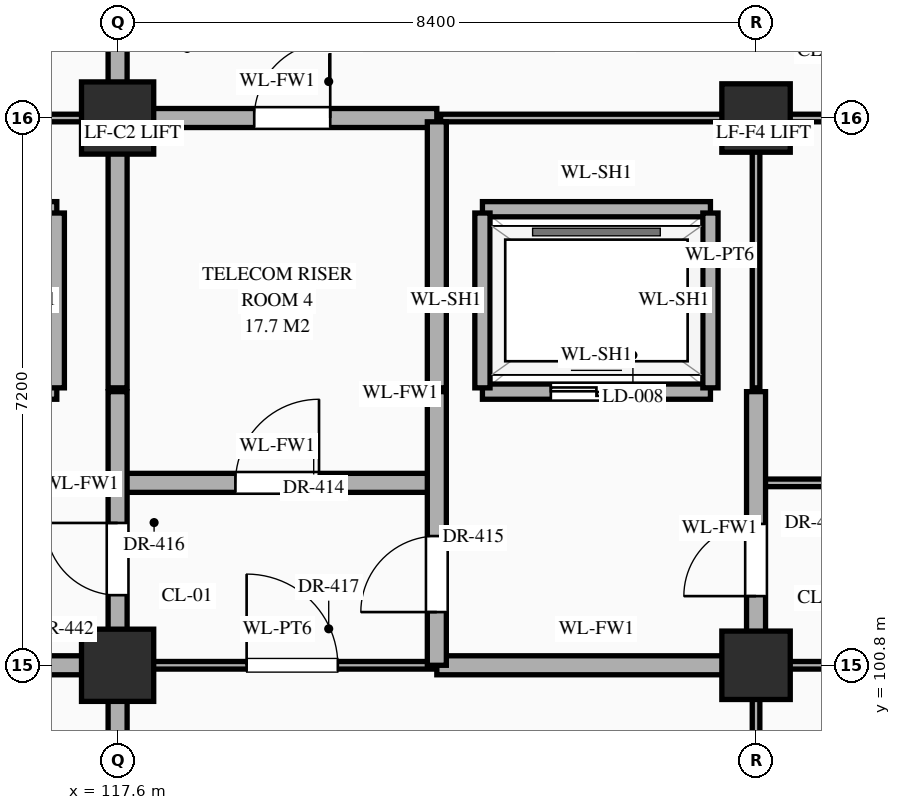
"""IFC4 building model, lengths in metres.
Left out: names, types, materials, properties, quantities, classifications, styles, units other than length and angle.
Written with IfcOpenShell. Run it as: python <this file> out.ifc"""

import sys

from ifc_helpers import new_model, si_unit, direction, frame, frame_2d, origin, origin_2d, place, context, subcontext, project, spatial, rectangle, extrude, element, fill, save


model = new_model("IFC4")
c1 = context("Model", 3, precision=1e-05, world=origin(), true_north=direction((0.0, 1.0)))
c2 = subcontext(c1, "Body", "Model", "MODEL_VIEW")
j1 = project(units=[si_unit("LENGTHUNIT", "METRE"), si_unit("PLANEANGLEUNIT", "RADIAN")], contexts=[c1])
p1 = place(None, origin())
s1 = spatial("IfcSite", under=j1, at=p1, CompositionType="ELEMENT")
p2 = place(p1, origin())
s2 = spatial("IfcBuilding", under=s1, at=p2, CompositionType="ELEMENT")
p3 = place(p2, frame((0.0, 0.0, -5.4)))
s3 = spatial("IfcBuildingStorey", under=s2, at=p3, CompositionType="ELEMENT", Elevation=-5.4)
for number, where, z_axis, x_axis in (
    (1, (117.6, 100.8, 0.0), (0.0, 0.0, 1.0), (1.0, 0.0, 0.0)),
    (2, (117.6, 108.0, 0.0), (0.0, 0.0, 1.0), (1.0, 0.0, 0.0)),
):
    element("IfcColumn", number, at=place(p3, frame(where, z_axis=z_axis, x_axis=x_axis)), inside=s3, PredefinedType="COLUMN", context=c2, shape_type="SweptSolid", body=[
        extrude(rectangle(XDim=0.95, YDim=0.95, at=origin_2d()), origin(), (0.0, 0.0, 1.0), 5.4),
    ])
for number, where, z_axis, x_axis in (
    (3, (126.0, 100.8, 0.0), (0.0, 0.0, 1.0), (1.0, 0.0, 0.0)),
    (4, (126.0, 108.0, 0.0), (0.0, 0.0, 1.0), (1.0, 0.0, 0.0)),
):
    element("IfcColumn", number, at=place(p3, frame(where, z_axis=z_axis, x_axis=x_axis)), inside=s3, PredefinedType="COLUMN", context=c2, shape_type="SweptSolid", body=[
        extrude(rectangle(XDim=0.9, YDim=0.9, at=origin_2d()), origin(), (0.0, 0.0, 1.0), 5.4),
    ])
p4 = place(p3, frame((113.4, 100.8, 0.0), z_axis=(0.0, 0.0, 1.0), x_axis=(1.0, 0.0, 0.0)))
e5 = element("IfcWall", 5, at=p4, inside=s3, PredefinedType="STANDARD", context=c2, shape_type="SweptSolid", body=[
    extrude(rectangle(XDim=4.2, YDim=0.25, at=frame_2d((2.1, 0.0))), origin(), (0.0, 0.0, 1.0), 4.25),
])
p5 = place(p4, frame((0.25, 0.0, 0.0)))
e6 = element("IfcOpeningElement", 6, at=p5, cuts=e5, PredefinedType="OPENING", context=c2, shape_type="SweptSolid", body=[
    extrude(rectangle(XDim=1.1, YDim=2.2, at=frame_2d((0.55, 1.1))), frame((0.0, 0.137, 0.0), z_axis=(0.0, -1.0, 0.0), x_axis=(1.0, 0.0, 0.0)), (0.0, 0.0, 1.0), 0.274),
])
p6 = place(p4, frame((2.202, 0.0, 0.0)))
e7 = element("IfcOpeningElement", 7, at=p6, cuts=e5, PredefinedType="OPENING", context=c2, shape_type="SweptSolid", body=[
    extrude(rectangle(XDim=1.0, YDim=2.2, at=frame_2d((0.5, 1.1))), frame((0.0, 0.137, 0.0), z_axis=(0.0, -1.0, 0.0), x_axis=(1.0, 0.0, 0.0)), (0.0, 0.0, 1.0), 0.274),
])
p7 = place(p3, frame((117.6, 100.8, 0.0), z_axis=(0.0, 0.0, 1.0), x_axis=(1.0, 0.0, 0.0)))
e8 = element("IfcWall", 8, at=p7, inside=s3, PredefinedType="STANDARD", context=c2, shape_type="SweptSolid", body=[
    extrude(rectangle(XDim=4.2, YDim=0.1, at=frame_2d((2.1, 0.0))), origin(), (0.0, 0.0, 1.0), 4.25),
])
p8 = place(p7, frame((1.698, 0.0, 0.0)))
e9 = element("IfcOpeningElement", 9, at=p8, cuts=e8, PredefinedType="OPENING", context=c2, shape_type="SweptSolid", body=[
    extrude(rectangle(XDim=1.2, YDim=2.35, at=frame_2d((0.6, 1.175))), frame((0.0, 0.062, 0.0), z_axis=(0.0, -1.0, 0.0), x_axis=(1.0, 0.0, 0.0)), (0.0, 0.0, 1.0), 0.124),
])
p9 = place(p3, frame((121.8, 100.8, 0.0), z_axis=(0.0, 0.0, 1.0), x_axis=(1.0, 0.0, 0.0)))
e10 = element("IfcWall", 10, at=p9, inside=s3, PredefinedType="STANDARD", context=c2, shape_type="SweptSolid", body=[
    extrude(rectangle(XDim=4.2, YDim=0.25, at=frame_2d((2.1, 0.0))), origin(), (0.0, 0.0, 1.0), 4.25),
])
p10 = place(p3, frame((126.0, 100.8, 0.0), z_axis=(0.0, 0.0, 1.0), x_axis=(1.0, 0.0, 0.0)))
e11 = element("IfcWall", 11, at=p10, inside=s3, PredefinedType="STANDARD", context=c2, shape_type="SweptSolid", body=[
    extrude(rectangle(XDim=25.2, YDim=0.1, at=frame_2d((12.6, 0.0))), origin(), (0.0, 0.0, 1.0), 4.25),
])
p11 = place(p10, frame((3.72, 0.0, 0.0)))
e12 = element("IfcOpeningElement", 12, at=p11, cuts=e11, PredefinedType="OPENING", context=c2, shape_type="SweptSolid", body=[
    extrude(rectangle(XDim=0.96, YDim=2.2, at=frame_2d((0.48, 1.1))), frame((0.0, 0.062, 0.0), z_axis=(0.0, -1.0, 0.0), x_axis=(1.0, 0.0, 0.0)), (0.0, 0.0, 1.0), 0.124),
])
p12 = place(p10, frame((9.785, 0.0, 0.0)))
e13 = element("IfcOpeningElement", 13, at=p12, cuts=e11, PredefinedType="OPENING", context=c2, shape_type="SweptSolid", body=[
    extrude(rectangle(XDim=1.0, YDim=2.25, at=frame_2d((0.5, 1.125))), frame((0.0, 0.062, 0.0), z_axis=(0.0, -1.0, 0.0), x_axis=(1.0, 0.0, 0.0)), (0.0, 0.0, 1.0), 0.124),
])
p13 = place(p10, frame((12.48, 0.0, 0.0)))
e14 = element("IfcOpeningElement", 14, at=p13, cuts=e11, PredefinedType="OPENING", context=c2, shape_type="SweptSolid", body=[
    extrude(rectangle(XDim=1.04, YDim=2.2, at=frame_2d((0.52, 1.1))), frame((0.0, 0.062, 0.0), z_axis=(0.0, -1.0, 0.0), x_axis=(1.0, 0.0, 0.0)), (0.0, 0.0, 1.0), 0.124),
])
p14 = place(p10, frame((14.775, 0.0, 0.0)))
e15 = element("IfcOpeningElement", 15, at=p14, cuts=e11, PredefinedType="OPENING", context=c2, shape_type="SweptSolid", body=[
    extrude(rectangle(XDim=1.08, YDim=2.25, at=frame_2d((0.54, 1.125))), frame((0.0, 0.062, 0.0), z_axis=(0.0, -1.0, 0.0), x_axis=(1.0, 0.0, 0.0)), (0.0, 0.0, 1.0), 0.124),
])
p15 = place(p10, frame((20.452, 0.0, 0.0)))
e16 = element("IfcOpeningElement", 16, at=p15, cuts=e11, PredefinedType="OPENING", context=c2, shape_type="SweptSolid", body=[
    extrude(rectangle(XDim=1.12, YDim=2.25, at=frame_2d((0.56, 1.125))), frame((0.0, 0.062, 0.0), z_axis=(0.0, -1.0, 0.0), x_axis=(1.0, 0.0, 0.0)), (0.0, 0.0, 1.0), 0.124),
])
p16 = place(p3, frame((117.6, 103.2, 0.0), z_axis=(0.0, 0.0, 1.0), x_axis=(1.0, 0.0, 0.0)))
e17 = element("IfcWall", 17, at=p16, inside=s3, PredefinedType="STANDARD", context=c2, shape_type="SweptSolid", body=[
    extrude(rectangle(XDim=4.2, YDim=0.25, at=frame_2d((2.1, 0.0))), origin(), (0.0, 0.0, 1.0), 5.1),
])
p17 = place(p16, frame((1.55, 0.0, 0.0)))
e18 = element("IfcOpeningElement", 18, at=p17, cuts=e17, PredefinedType="OPENING", context=c2, shape_type="SweptSolid", body=[
    extrude(rectangle(XDim=1.1, YDim=2.2, at=frame_2d((0.55, 1.1))), frame((0.0, 0.137, 0.0), z_axis=(0.0, -1.0, 0.0), x_axis=(1.0, 0.0, 0.0)), (0.0, 0.0, 1.0), 0.274),
])
p18 = place(p3, frame((126.0, 103.2, 0.0), z_axis=(0.0, 0.0, 1.0), x_axis=(1.0, 0.0, 0.0)))
e19 = element("IfcWall", 19, at=p18, inside=s3, PredefinedType="STANDARD", context=c2, shape_type="SweptSolid", body=[
    extrude(rectangle(XDim=25.2, YDim=0.1, at=frame_2d((12.6, 0.0))), origin(), (0.0, 0.0, 1.0), 5.1),
])
p19 = place(p18, frame((3.75, 0.0, 0.0)))
e20 = element("IfcOpeningElement", 20, at=p19, cuts=e19, PredefinedType="OPENING", context=c2, shape_type="SweptSolid", body=[
    extrude(rectangle(XDim=0.9, YDim=2.15, at=frame_2d((0.45, 1.075))), frame((0.0, 0.062, 0.0), z_axis=(0.0, -1.0, 0.0), x_axis=(1.0, 0.0, 0.0)), (0.0, 0.0, 1.0), 0.124),
])
p20 = place(p18, frame((12.17, 0.0, 0.0)))
e21 = element("IfcOpeningElement", 21, at=p20, cuts=e19, PredefinedType="OPENING", context=c2, shape_type="SweptSolid", body=[
    extrude(rectangle(XDim=0.86, YDim=2.1, at=frame_2d((0.43, 1.05))), frame((0.0, 0.062, 0.0), z_axis=(0.0, -1.0, 0.0), x_axis=(1.0, 0.0, 0.0)), (0.0, 0.0, 1.0), 0.124),
])
p21 = place(p18, frame((20.54, 0.0, 0.0)))
e22 = element("IfcOpeningElement", 22, at=p21, cuts=e19, PredefinedType="OPENING", context=c2, shape_type="SweptSolid", body=[
    extrude(rectangle(XDim=0.92, YDim=2.15, at=frame_2d((0.46, 1.075))), frame((0.0, 0.062, 0.0), z_axis=(0.0, -1.0, 0.0), x_axis=(1.0, 0.0, 0.0)), (0.0, 0.0, 1.0), 0.124),
])
p22 = place(p3, frame((114.4, 104.4, 0.0), z_axis=(0.0, 0.0, 1.0), x_axis=(1.0, 0.0, 0.0)))
e23 = element("IfcWall", 23, at=p22, inside=s3, PredefinedType="STANDARD", context=c2, shape_type="SweptSolid", body=[
    extrude(rectangle(XDim=2.4, YDim=0.2, at=frame_2d((1.2, 0.0))), origin(), (0.0, 0.0, 1.0), 5.1),
])
p23 = place(p22, frame((0.675, 0.0, 0.0)))
e24 = element("IfcOpeningElement", 24, at=p23, cuts=e23, PredefinedType="OPENING", context=c2, shape_type="SweptSolid", body=[
    extrude(rectangle(XDim=1.05, YDim=2.15, at=frame_2d((0.525, 1.075))), frame((0.0, 0.112, 0.0), z_axis=(0.0, -1.0, 0.0), x_axis=(1.0, 0.0, 0.0)), (0.0, 0.0, 1.0), 0.224),
])
p24 = place(p3, frame((122.4, 104.4, 0.0), z_axis=(0.0, 0.0, 1.0), x_axis=(1.0, 0.0, 0.0)))
e25 = element("IfcWall", 25, at=p24, inside=s3, PredefinedType="STANDARD", context=c2, shape_type="SweptSolid", body=[
    extrude(rectangle(XDim=3.0, YDim=0.2, at=frame_2d((1.5, 0.0))), origin(), (0.0, 0.0, 1.0), 5.1),
])
p25 = place(p24, frame((0.9, 0.0, 0.0)))
e26 = element("IfcOpeningElement", 26, at=p25, cuts=e25, PredefinedType="OPENING", context=c2, shape_type="SweptSolid", body=[
    extrude(rectangle(XDim=1.2, YDim=2.15, at=frame_2d((0.6, 1.075))), frame((0.0, 0.112, 0.0), z_axis=(0.0, -1.0, 0.0), x_axis=(1.0, 0.0, 0.0)), (0.0, 0.0, 1.0), 0.224),
])
p26 = place(p3, frame((114.4, 106.8, 0.0), z_axis=(0.0, 0.0, 1.0), x_axis=(1.0, 0.0, 0.0)))
e27 = element("IfcWall", 27, at=p26, inside=s3, PredefinedType="STANDARD", context=c2, shape_type="SweptSolid", body=[
    extrude(rectangle(XDim=2.4, YDim=0.2, at=frame_2d((1.2, 0.0))), origin(), (0.0, 0.0, 1.0), 5.1),
])
p27 = place(p3, frame((122.4, 106.8, 0.0), z_axis=(0.0, 0.0, 1.0), x_axis=(1.0, 0.0, 0.0)))
e28 = element("IfcWall", 28, at=p27, inside=s3, PredefinedType="STANDARD", context=c2, shape_type="SweptSolid", body=[
    extrude(rectangle(XDim=3.0, YDim=0.2, at=frame_2d((1.5, 0.0))), origin(), (0.0, 0.0, 1.0), 5.1),
])
p28 = place(p3, frame((113.45, 108.0, 0.0), z_axis=(0.0, 0.0, 1.0), x_axis=(1.0, 0.0, 0.0)))
e29 = element("IfcWall", 29, at=p28, inside=s3, PredefinedType="STANDARD", context=c2, shape_type="SweptSolid", body=[
    extrude(rectangle(XDim=4.1, YDim=0.1, at=frame_2d((2.05, 0.0))), origin(), (0.0, 0.0, 1.0), 4.25),
])
p29 = place(p3, frame((117.6, 108.0, 0.0), z_axis=(0.0, 0.0, 1.0), x_axis=(1.0, 0.0, 0.0)))
e30 = element("IfcWall", 30, at=p29, inside=s3, PredefinedType="STANDARD", context=c2, shape_type="SweptSolid", body=[
    extrude(rectangle(XDim=4.2, YDim=0.25, at=frame_2d((2.1, 0.0))), origin(), (0.0, 0.0, 1.0), 4.13),
])
p30 = place(p29, frame((1.798, 0.0, 0.0)))
e31 = element("IfcOpeningElement", 31, at=p30, cuts=e30, PredefinedType="OPENING", context=c2, shape_type="SweptSolid", body=[
    extrude(rectangle(XDim=1.0, YDim=2.2, at=frame_2d((0.5, 1.1))), frame((0.0, 0.137, 0.0), z_axis=(0.0, -1.0, 0.0), x_axis=(1.0, 0.0, 0.0)), (0.0, 0.0, 1.0), 0.274),
])
p31 = place(p3, frame((121.85, 108.0, 0.0), z_axis=(0.0, 0.0, 1.0), x_axis=(1.0, 0.0, 0.0)))
e32 = element("IfcWall", 32, at=p31, inside=s3, PredefinedType="STANDARD", context=c2, shape_type="SweptSolid", body=[
    extrude(rectangle(XDim=4.1, YDim=0.1, at=frame_2d((2.05, 0.0))), origin(), (0.0, 0.0, 1.0), 4.13),
])
p32 = place(p3, frame((126.0, 108.0, 0.0), z_axis=(0.0, 0.0, 1.0), x_axis=(1.0, 0.0, 0.0)))
e33 = element("IfcWall", 33, at=p32, inside=s3, PredefinedType="STANDARD", context=c2, shape_type="SweptSolid", body=[
    extrude(rectangle(XDim=25.2, YDim=0.1, at=frame_2d((12.6, 0.0))), origin(), (0.0, 0.0, 1.0), 4.13),
])
p33 = place(p32, frame((3.62, 0.0, 0.0)))
e34 = element("IfcOpeningElement", 34, at=p33, cuts=e33, PredefinedType="OPENING", context=c2, shape_type="SweptSolid", body=[
    extrude(rectangle(XDim=1.16, YDim=2.3, at=frame_2d((0.58, 1.15))), frame((0.0, 0.062, 0.0), z_axis=(0.0, -1.0, 0.0), x_axis=(1.0, 0.0, 0.0)), (0.0, 0.0, 1.0), 0.124),
])
p34 = place(p32, frame((12.0, 0.0, 0.0)))
e35 = element("IfcOpeningElement", 35, at=p34, cuts=e33, PredefinedType="OPENING", context=c2, shape_type="SweptSolid", body=[
    extrude(rectangle(XDim=1.2, YDim=2.35, at=frame_2d((0.6, 1.175))), frame((0.0, 0.062, 0.0), z_axis=(0.0, -1.0, 0.0), x_axis=(1.0, 0.0, 0.0)), (0.0, 0.0, 1.0), 0.124),
])
p35 = place(p32, frame((20.393, 0.0, 0.0)))
e36 = element("IfcOpeningElement", 36, at=p35, cuts=e33, PredefinedType="OPENING", context=c2, shape_type="SweptSolid", body=[
    extrude(rectangle(XDim=1.24, YDim=2.3, at=frame_2d((0.62, 1.15))), frame((0.0, 0.062, 0.0), z_axis=(0.0, -1.0, 0.0), x_axis=(1.0, 0.0, 0.0)), (0.0, 0.0, 1.0), 0.124),
])
p36 = place(p3, frame((116.8, 104.45, 0.0), z_axis=(0.0, 0.0, 1.0), x_axis=(0.0, 1.0, 0.0)))
e37 = element("IfcWall", 37, at=p36, inside=s3, PredefinedType="STANDARD", context=c2, shape_type="SweptSolid", body=[
    extrude(rectangle(XDim=2.3, YDim=0.2, at=frame_2d((1.15, 0.0))), origin(), (0.0, 0.0, 1.0), 5.1),
])
p37 = place(p3, frame((117.6, 91.2, 0.0), z_axis=(0.0, 0.0, 1.0), x_axis=(0.0, 1.0, 0.0)))
e38 = element("IfcWall", 38, at=p37, inside=s3, PredefinedType="STANDARD", context=c2, shape_type="SweptSolid", body=[
    extrude(rectangle(XDim=13.2, YDim=0.25, at=frame_2d((6.6, 0.0))), origin(), (0.0, 0.0, 1.0), 4.35),
])
p38 = place(p37, frame((0.502, 0.0, 0.0)))
e39 = element("IfcOpeningElement", 39, at=p38, cuts=e38, PredefinedType="OPENING", context=c2, shape_type="SweptSolid", body=[
    extrude(rectangle(XDim=1.0, YDim=2.2, at=frame_2d((0.5, 1.1))), frame((0.0, 0.137, 0.0), z_axis=(0.0, -1.0, 0.0), x_axis=(1.0, 0.0, 0.0)), (0.0, 0.0, 1.0), 0.274),
])
p39 = place(p37, frame((10.522, 0.0, 0.0)))
e40 = element("IfcOpeningElement", 40, at=p39, cuts=e38, PredefinedType="OPENING", context=c2, shape_type="SweptSolid", body=[
    extrude(rectangle(XDim=0.95, YDim=2.15, at=frame_2d((0.475, 1.075))), frame((0.0, 0.137, 0.0), z_axis=(0.0, -1.0, 0.0), x_axis=(1.0, 0.0, 0.0)), (0.0, 0.0, 1.0), 0.274),
])
p40 = place(p37, frame((3.248, 0.0, 0.0)))
e41 = element("IfcOpeningElement", 41, at=p40, cuts=e38, PredefinedType="OPENING", context=c2, shape_type="SweptSolid", body=[
    extrude(rectangle(XDim=1.1, YDim=2.2, at=frame_2d((0.55, 1.1))), frame((0.0, 0.137, 0.0), z_axis=(0.0, -1.0, 0.0), x_axis=(1.0, 0.0, 0.0)), (0.0, 0.0, 1.0), 0.274),
])
p41 = place(p3, frame((117.6, 104.45, 0.0), z_axis=(0.0, 0.0, 1.0), x_axis=(0.0, 1.0, 0.0)))
e42 = element("IfcWall", 42, at=p41, inside=s3, PredefinedType="STANDARD", context=c2, shape_type="SweptSolid", body=[
    extrude(rectangle(XDim=3.5, YDim=0.25, at=frame_2d((1.75, 0.0))), origin(), (0.0, 0.0, 1.0), 4.35),
])
p42 = place(p3, frame((117.6, 108.0, 0.0), z_axis=(0.0, 0.0, 1.0), x_axis=(0.0, 1.0, 0.0)))
e43 = element("IfcWall", 43, at=p42, inside=s3, PredefinedType="STANDARD", context=c2, shape_type="SweptSolid", body=[
    extrude(rectangle(XDim=7.16, YDim=0.25, at=frame_2d((3.58, 0.0))), origin(), (0.0, 0.0, 1.0), 4.23),
])
p43 = place(p42, frame((0.897, 0.0, 0.0)))
e44 = element("IfcOpeningElement", 44, at=p43, cuts=e43, PredefinedType="OPENING", context=c2, shape_type="SweptSolid", body=[
    extrude(rectangle(XDim=1.0, YDim=2.2, at=frame_2d((0.5, 1.1))), frame((0.0, 0.137, 0.0), z_axis=(0.0, -1.0, 0.0), x_axis=(1.0, 0.0, 0.0)), (0.0, 0.0, 1.0), 0.274),
])
p44 = place(p3, frame((121.8, 100.8, 0.0), z_axis=(0.0, 0.0, 1.0), x_axis=(0.0, 1.0, 0.0)))
e45 = element("IfcWall", 45, at=p44, inside=s3, PredefinedType="STANDARD", context=c2, shape_type="SweptSolid", body=[
    extrude(rectangle(XDim=3.6, YDim=0.25, at=frame_2d((1.8, 0.0))), origin(), (0.0, 0.0, 1.0), 4.55),
])
p45 = place(p44, frame((0.7, 0.0, 0.0)))
e46 = element("IfcOpeningElement", 46, at=p45, cuts=e45, PredefinedType="OPENING", context=c2, shape_type="SweptSolid", body=[
    extrude(rectangle(XDim=1.0, YDim=2.2, at=frame_2d((0.5, 1.1))), frame((0.0, 0.137, 0.0), z_axis=(0.0, -1.0, 0.0), x_axis=(1.0, 0.0, 0.0)), (0.0, 0.0, 1.0), 0.274),
])
p46 = place(p3, frame((121.8, 104.45, 0.0), z_axis=(0.0, 0.0, 1.0), x_axis=(0.0, 1.0, 0.0)))
e47 = element("IfcWall", 47, at=p46, inside=s3, PredefinedType="STANDARD", context=c2, shape_type="SweptSolid", body=[
    extrude(rectangle(XDim=3.5, YDim=0.25, at=frame_2d((1.75, 0.0))), origin(), (0.0, 0.0, 1.0), 4.55),
])
for number, where, z_axis, x_axis in (
    (48, (122.4, 104.45, 0.0), (0.0, 0.0, 1.0), (0.0, 1.0, 0.0)),
    (49, (125.4, 104.45, 0.0), (0.0, 0.0, 1.0), (0.0, 1.0, 0.0)),
):
    element("IfcWall", number, at=place(p3, frame(where, z_axis=z_axis, x_axis=x_axis)), inside=s3, PredefinedType="STANDARD", context=c2, shape_type="SweptSolid", body=[
        extrude(rectangle(XDim=2.3, YDim=0.2, at=frame_2d((1.15, 0.0))), origin(), (0.0, 0.0, 1.0), 5.1),
    ])
p47 = place(p3, frame((126.0, 96.0, 0.0), z_axis=(0.0, 0.0, 1.0), x_axis=(0.0, 1.0, 0.0)))
e50 = element("IfcWall", 50, at=p47, inside=s3, PredefinedType="STANDARD", context=c2, shape_type="SweptSolid", body=[
    extrude(rectangle(XDim=4.8, YDim=0.1, at=frame_2d((2.4, 0.0))), origin(), (0.0, 0.0, 1.0), 4.35),
])
p48 = place(p3, frame((126.0, 100.8, 0.0), z_axis=(0.0, 0.0, 1.0), x_axis=(0.0, 1.0, 0.0)))
e51 = element("IfcWall", 51, at=p48, inside=s3, PredefinedType="STANDARD", context=c2, shape_type="SweptSolid", body=[
    extrude(rectangle(XDim=3.6, YDim=0.25, at=frame_2d((1.8, 0.0))), origin(), (0.0, 0.0, 1.0), 4.35),
])
p49 = place(p48, frame((0.91, 0.0, 0.0)))
e52 = element("IfcOpeningElement", 52, at=p49, cuts=e51, PredefinedType="OPENING", context=c2, shape_type="SweptSolid", body=[
    extrude(rectangle(XDim=0.95, YDim=2.15, at=frame_2d((0.475, 1.075))), frame((0.0, 0.137, 0.0), z_axis=(0.0, -1.0, 0.0), x_axis=(1.0, 0.0, 0.0)), (0.0, 0.0, 1.0), 0.274),
])
p50 = place(p3, frame((126.0, 104.45, 0.0), z_axis=(0.0, 0.0, 1.0), x_axis=(0.0, 1.0, 0.0)))
e53 = element("IfcWall", 53, at=p50, inside=s3, PredefinedType="STANDARD", context=c2, shape_type="SweptSolid", body=[
    extrude(rectangle(XDim=3.5, YDim=0.1, at=frame_2d((1.75, 0.0))), origin(), (0.0, 0.0, 1.0), 4.35),
])
p51 = place(p25, origin())
e54 = element("IfcDoor", 54, at=p51, inside=s3, OperationType="DOUBLE_DOOR_SLIDING", PredefinedType="DOOR", context=c2, shape_type="SweptSolid", body=[
    extrude(rectangle(XDim=1.2, YDim=2.15, at=frame_2d((0.6, 1.075))), frame((0.0, 0.025, 0.0), z_axis=(0.0, -1.0, 0.0), x_axis=(1.0, 0.0, 0.0)), (0.0, 0.0, 1.0), 0.05),
])
fill(e26, e54)
p52 = place(p17, origin())
e55 = element("IfcDoor", 55, at=p52, inside=s3, OperationType="SINGLE_SWING_RIGHT", PredefinedType="DOOR", context=c2, shape_type="SweptSolid", body=[
    extrude(rectangle(XDim=1.1, YDim=2.2, at=frame_2d((0.55, 1.1))), frame((0.0, 0.025, 0.0), z_axis=(0.0, -1.0, 0.0), x_axis=(1.0, 0.0, 0.0)), (0.0, 0.0, 1.0), 0.05),
])
fill(e18, e55)
p53 = place(p45, origin())
e56 = element("IfcDoor", 56, at=p53, inside=s3, OperationType="SINGLE_SWING_LEFT", PredefinedType="DOOR", context=c2, shape_type="SweptSolid", body=[
    extrude(rectangle(XDim=1.0, YDim=2.2, at=frame_2d((0.5, 1.1))), frame((0.0, 0.025, 0.0), z_axis=(0.0, -1.0, 0.0), x_axis=(1.0, 0.0, 0.0)), (0.0, 0.0, 1.0), 0.05),
])
fill(e46, e56)
p54 = place(p39, origin())
e57 = element("IfcDoor", 57, at=p54, inside=s3, OperationType="SINGLE_SWING_RIGHT", PredefinedType="DOOR", context=c2, shape_type="SweptSolid", body=[
    extrude(rectangle(XDim=0.95, YDim=2.15, at=frame_2d((0.475, 1.075))), frame((0.0, 0.025, 0.0), z_axis=(0.0, -1.0, 0.0), x_axis=(1.0, 0.0, 0.0)), (0.0, 0.0, 1.0), 0.05),
])
fill(e40, e57)
p55 = place(p8, origin())
e58 = element("IfcDoor", 58, at=p55, inside=s3, OperationType="SINGLE_SWING_LEFT", PredefinedType="DOOR", context=c2, shape_type="SweptSolid", body=[
    extrude(rectangle(XDim=1.2, YDim=2.35, at=frame_2d((0.6, 1.175))), frame((0.0, 0.025, 0.0), z_axis=(0.0, -1.0, 0.0), x_axis=(1.0, 0.0, 0.0)), (0.0, 0.0, 1.0), 0.05),
])
fill(e9, e58)
p56 = place(p30, origin())
e59 = element("IfcDoor", 59, at=p56, inside=s3, OperationType="SINGLE_SWING_RIGHT", PredefinedType="DOOR", context=c2, shape_type="SweptSolid", body=[
    extrude(rectangle(XDim=1.0, YDim=2.2, at=frame_2d((0.5, 1.1))), frame((0.0, 0.025, 0.0), z_axis=(0.0, -1.0, 0.0), x_axis=(1.0, 0.0, 0.0)), (0.0, 0.0, 1.0), 0.05),
])
fill(e31, e59)
p57 = place(p49, origin())
e60 = element("IfcDoor", 60, at=p57, inside=s3, OperationType="SINGLE_SWING_LEFT", PredefinedType="DOOR", context=c2, shape_type="SweptSolid", body=[
    extrude(rectangle(XDim=0.95, YDim=2.15, at=frame_2d((0.475, 1.075))), frame((0.0, 0.025, 0.0), z_axis=(0.0, -1.0, 0.0), x_axis=(1.0, 0.0, 0.0)), (0.0, 0.0, 1.0), 0.05),
])
fill(e52, e60)
save(model, sys.argv[1])
